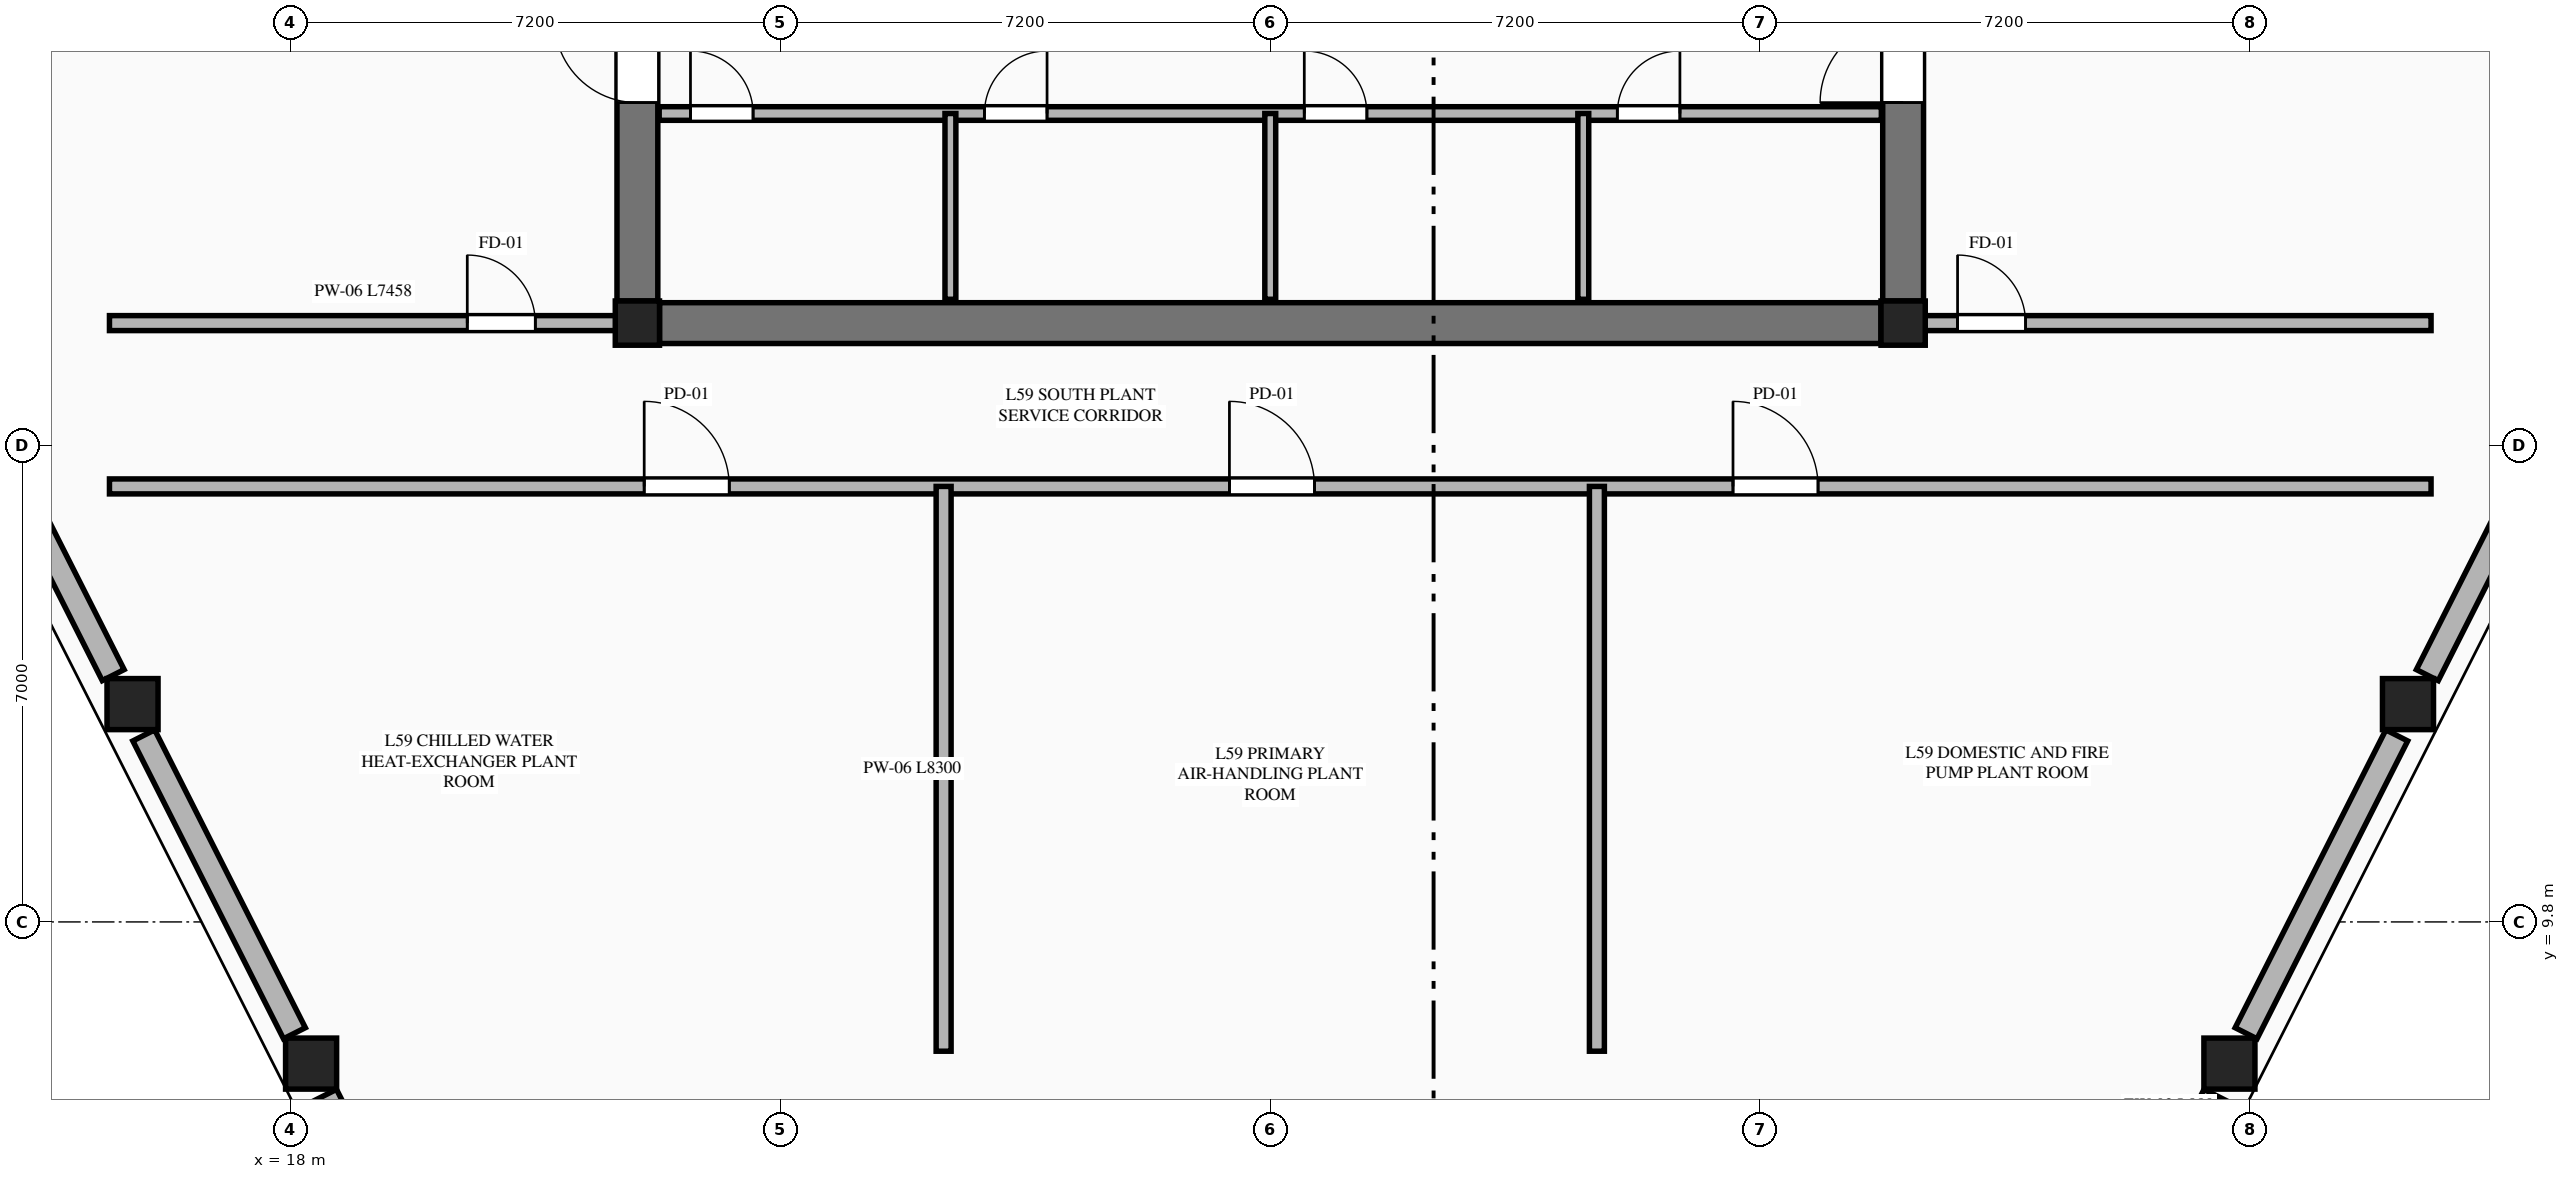
"""IFC4 building model, lengths in metres.
Left out: names, types, materials, properties, quantities, classifications, styles, units other than length and angle.
Written with IfcOpenShell. Run it as: python <this file> out.ifc"""

import sys

from ifc_helpers import new_model, si_unit, direction, frame, frame_2d, origin, origin_2d, place, context, subcontext, project, spatial, rectangle, extrude, element, fill, save


model = new_model("IFC4")
c1 = context("Model", 3, precision=1e-05, world=origin(), true_north=direction((0.0, 1.0)))
c2 = subcontext(c1, "Body", "Model", "MODEL_VIEW")
j1 = project(units=[si_unit("LENGTHUNIT", "METRE"), si_unit("PLANEANGLEUNIT", "RADIAN")], contexts=[c1])
p1 = place(None, origin())
s1 = spatial("IfcSite", under=j1, at=p1, CompositionType="ELEMENT")
p2 = place(p1, origin())
s2 = spatial("IfcBuilding", under=s1, at=p2, CompositionType="ELEMENT")
p3 = place(p2, frame((0.0, 0.0, 221.6)))
s3 = spatial("IfcBuildingStorey", under=s2, at=p3, CompositionType="ELEMENT", Elevation=221.6)
for number, where, z_axis, x_axis in (
    (1, (23.1, 18.6, 0.0), (0.0, 0.0, 1.0), (1.0, 0.0, 0.0)),
    (2, (41.7, 18.6, 0.0), (0.0, 0.0, 1.0), (1.0, 0.0, 0.0)),
):
    element("IfcColumn", number, at=place(p3, frame(where, z_axis=z_axis, x_axis=x_axis)), inside=s3, PredefinedType="COLUMN", context=c2, shape_type="SweptSolid", body=[
        extrude(rectangle(XDim=0.65, YDim=0.65, at=origin_2d()), origin(), (0.0, 0.0, 1.0), 5.4),
    ])
p4 = place(p3, frame((23.425, 18.6, 0.0), z_axis=(0.0, 0.0, 1.0), x_axis=(1.0, 0.0, 0.0)))
e3 = element("IfcWall", 3, at=p4, inside=s3, PredefinedType="SHEAR", context=c2, shape_type="SweptSolid", body=[
    extrude(rectangle(XDim=17.95, YDim=0.6, at=frame_2d((8.975, 0.0))), origin(), (0.0, 0.0, 1.0), 5.2),
])
p5 = place(p3, frame((23.1, 18.925, 0.0), z_axis=(0.0, 0.0, 1.0), x_axis=(0.0, 1.0, 0.0)))
e4 = element("IfcWall", 4, at=p5, inside=s3, PredefinedType="SHEAR", context=c2, shape_type="SweptSolid", body=[
    extrude(rectangle(XDim=13.95, YDim=0.6, at=frame_2d((6.975, 0.0))), origin(), (0.0, 0.0, 1.0), 5.2),
])
p6 = place(p5, frame((2.915, 0.0, 0.0)))
e5 = element("IfcOpeningElement", 5, at=p6, cuts=e4, PredefinedType="OPENING", context=c2, shape_type="SweptSolid", body=[
    extrude(rectangle(XDim=1.22, YDim=2.25, at=frame_2d((0.61, 1.125))), frame((0.0, 0.31, 0.0), z_axis=(0.0, -1.0, 0.0), x_axis=(1.0, 0.0, 0.0)), (0.0, 0.0, 1.0), 0.62),
])
p7 = place(p3, frame((41.7, 18.925, 0.0), z_axis=(0.0, 0.0, 1.0), x_axis=(0.0, 1.0, 0.0)))
e6 = element("IfcWall", 6, at=p7, inside=s3, PredefinedType="SHEAR", context=c2, shape_type="SweptSolid", body=[
    extrude(rectangle(XDim=13.95, YDim=0.6, at=frame_2d((6.975, 0.0))), origin(), (0.0, 0.0, 1.0), 5.2),
])
p8 = place(p7, frame((2.915, 0.0, 0.0)))
e7 = element("IfcOpeningElement", 7, at=p8, cuts=e6, PredefinedType="OPENING", context=c2, shape_type="SweptSolid", body=[
    extrude(rectangle(XDim=1.22, YDim=2.25, at=frame_2d((0.61, 1.125))), frame((0.0, 0.31, 0.0), z_axis=(0.0, -1.0, 0.0), x_axis=(1.0, 0.0, 0.0)), (0.0, 0.0, 1.0), 0.62),
])
for number, where, z_axis, x_axis in (
    (8, (46.495, 7.718, 0.0), (0.0, 0.0, 1.0), (1.0, 0.0, 0.0)),
    (9, (49.119, 13.001, 0.0), (0.0, 0.0, 1.0), (1.0, 0.0, 0.0)),
    (10, (15.681, 13.001, 0.0), (0.0, 0.0, 1.0), (1.0, 0.0, 0.0)),
    (11, (18.305, 7.718, 0.0), (0.0, 0.0, 1.0), (1.0, 0.0, 0.0)),
):
    element("IfcColumn", number, at=place(p3, frame(where, z_axis=z_axis, x_axis=x_axis)), inside=s3, PredefinedType="COLUMN", context=c2, shape_type="SweptSolid", body=[
        extrude(rectangle(XDim=0.75, YDim=0.75, at=origin_2d()), origin(), (0.0, 0.0, 1.0), 5.4),
    ])
p9 = place(p3, frame((23.42, 21.68, 0.0), z_axis=(0.0, 0.0, 1.0), x_axis=(1.0, 0.0, 0.0)))
e12 = element("IfcWall", 12, at=p9, inside=s3, PredefinedType="PLUMBINGWALL", context=c2, shape_type="SweptSolid", body=[
    extrude(rectangle(XDim=17.96, YDim=0.2, at=frame_2d((8.98, 0.0))), origin(), (0.0, 0.0, 1.0), 5.2),
])
p10 = place(p9, frame((0.46, 0.0, 0.0)))
e13 = element("IfcOpeningElement", 13, at=p10, cuts=e12, PredefinedType="OPENING", context=c2, shape_type="SweptSolid", body=[
    extrude(rectangle(XDim=0.92, YDim=2.15, at=frame_2d((0.46, 1.075))), frame((0.0, 0.11, 0.0), z_axis=(0.0, -1.0, 0.0), x_axis=(1.0, 0.0, 0.0)), (0.0, 0.0, 1.0), 0.22),
])
p11 = place(p9, frame((4.78, 0.0, 0.0)))
e14 = element("IfcOpeningElement", 14, at=p11, cuts=e12, PredefinedType="OPENING", context=c2, shape_type="SweptSolid", body=[
    extrude(rectangle(XDim=0.92, YDim=2.15, at=frame_2d((0.46, 1.075))), frame((0.0, 0.11, 0.0), z_axis=(0.0, -1.0, 0.0), x_axis=(1.0, 0.0, 0.0)), (0.0, 0.0, 1.0), 0.22),
])
p12 = place(p9, frame((9.48, 0.0, 0.0)))
e15 = element("IfcOpeningElement", 15, at=p12, cuts=e12, PredefinedType="OPENING", context=c2, shape_type="SweptSolid", body=[
    extrude(rectangle(XDim=0.92, YDim=2.15, at=frame_2d((0.46, 1.075))), frame((0.0, 0.11, 0.0), z_axis=(0.0, -1.0, 0.0), x_axis=(1.0, 0.0, 0.0)), (0.0, 0.0, 1.0), 0.22),
])
p13 = place(p9, frame((14.08, 0.0, 0.0)))
e16 = element("IfcOpeningElement", 16, at=p13, cuts=e12, PredefinedType="OPENING", context=c2, shape_type="SweptSolid", body=[
    extrude(rectangle(XDim=0.92, YDim=2.15, at=frame_2d((0.46, 1.075))), frame((0.0, 0.11, 0.0), z_axis=(0.0, -1.0, 0.0), x_axis=(1.0, 0.0, 0.0)), (0.0, 0.0, 1.0), 0.22),
])
for number, where, z_axis, x_axis in (
    (17, (27.7, 18.95, 0.0), (0.0, 0.0, 1.0), (0.0, 1.0, 0.0)),
    (18, (32.4, 18.95, 0.0), (0.0, 0.0, 1.0), (0.0, 1.0, 0.0)),
    (19, (37.0, 18.95, 0.0), (0.0, 0.0, 1.0), (0.0, 1.0, 0.0)),
):
    element("IfcWall", number, at=place(p3, frame(where, z_axis=z_axis, x_axis=x_axis)), inside=s3, PredefinedType="PARTITIONING", context=c2, shape_type="SweptSolid", body=[
        extrude(rectangle(XDim=2.73, YDim=0.16, at=frame_2d((1.365, 0.0))), origin(), (0.0, 0.0, 1.0), 5.2),
    ])
p14 = place(p3, frame((15.342, 18.6, 0.0), z_axis=(0.0, 0.0, 1.0), x_axis=(1.0, 0.0, 0.0)))
e20 = element("IfcWall", 20, at=p14, inside=s3, PredefinedType="PARTITIONING", context=c2, shape_type="SweptSolid", body=[
    extrude(rectangle(XDim=7.458, YDim=0.22, at=frame_2d((3.729, 0.0))), origin(), (0.0, 0.0, 1.0), 3.79),
])
p15 = place(p14, frame((5.258, 0.0, 0.0)))
e21 = element("IfcOpeningElement", 21, at=p15, cuts=e20, PredefinedType="OPENING", context=c2, shape_type="SweptSolid", body=[
    extrude(rectangle(XDim=1.0, YDim=2.15, at=frame_2d((0.5, 1.075))), frame((0.0, 0.12, 0.0), z_axis=(0.0, -1.0, 0.0), x_axis=(1.0, 0.0, 0.0)), (0.0, 0.0, 1.0), 0.24),
])
p16 = place(p3, frame((42.0, 18.6, 0.0), z_axis=(0.0, 0.0, 1.0), x_axis=(1.0, 0.0, 0.0)))
e22 = element("IfcWall", 22, at=p16, inside=s3, PredefinedType="PARTITIONING", context=c2, shape_type="SweptSolid", body=[
    extrude(rectangle(XDim=7.458, YDim=0.22, at=frame_2d((3.729, 0.0))), origin(), (0.0, 0.0, 1.0), 3.79),
])
p17 = place(p16, frame((0.5, 0.0, 0.0)))
e23 = element("IfcOpeningElement", 23, at=p17, cuts=e22, PredefinedType="OPENING", context=c2, shape_type="SweptSolid", body=[
    extrude(rectangle(XDim=1.0, YDim=2.15, at=frame_2d((0.5, 1.075))), frame((0.0, 0.12, 0.0), z_axis=(0.0, -1.0, 0.0), x_axis=(1.0, 0.0, 0.0)), (0.0, 0.0, 1.0), 0.24),
])
p18 = place(p3, frame((15.342, 16.2, 0.0), z_axis=(0.0, 0.0, 1.0), x_axis=(1.0, 0.0, 0.0)))
e24 = element("IfcWall", 24, at=p18, inside=s3, PredefinedType="PARTITIONING", context=c2, shape_type="SweptSolid", body=[
    extrude(rectangle(XDim=34.116, YDim=0.22, at=frame_2d((17.058, 0.0))), origin(), (0.0, 0.0, 1.0), 5.2),
])
p19 = place(p18, frame((7.858, 0.0, 0.0)))
e25 = element("IfcOpeningElement", 25, at=p19, cuts=e24, PredefinedType="OPENING", context=c2, shape_type="SweptSolid", body=[
    extrude(rectangle(XDim=1.25, YDim=2.25, at=frame_2d((0.625, 1.125))), frame((0.0, 0.12, 0.0), z_axis=(0.0, -1.0, 0.0), x_axis=(1.0, 0.0, 0.0)), (0.0, 0.0, 1.0), 0.24),
])
p20 = place(p18, frame((16.458, 0.0, 0.0)))
e26 = element("IfcOpeningElement", 26, at=p20, cuts=e24, PredefinedType="OPENING", context=c2, shape_type="SweptSolid", body=[
    extrude(rectangle(XDim=1.25, YDim=2.25, at=frame_2d((0.625, 1.125))), frame((0.0, 0.12, 0.0), z_axis=(0.0, -1.0, 0.0), x_axis=(1.0, 0.0, 0.0)), (0.0, 0.0, 1.0), 0.24),
])
p21 = place(p18, frame((23.858, 0.0, 0.0)))
e27 = element("IfcOpeningElement", 27, at=p21, cuts=e24, PredefinedType="OPENING", context=c2, shape_type="SweptSolid", body=[
    extrude(rectangle(XDim=1.25, YDim=2.25, at=frame_2d((0.625, 1.125))), frame((0.0, 0.12, 0.0), z_axis=(0.0, -1.0, 0.0), x_axis=(1.0, 0.0, 0.0)), (0.0, 0.0, 1.0), 0.24),
])
for number, where, z_axis, x_axis in (
    (28, (27.6, 7.9, 0.0), (0.0, 0.0, 1.0), (0.0, 1.0, 0.0)),
    (29, (37.2, 7.9, 0.0), (0.0, 0.0, 1.0), (0.0, 1.0, 0.0)),
):
    element("IfcWall", number, at=place(p3, frame(where, z_axis=z_axis, x_axis=x_axis)), inside=s3, PredefinedType="PARTITIONING", context=c2, shape_type="SweptSolid", body=[
        extrude(rectangle(XDim=8.3, YDim=0.22, at=frame_2d((4.15, 0.0))), origin(), (0.0, 0.0, 1.0), 5.2),
    ])
p22 = place(p3, frame((45.881, 6.465, 0.0), z_axis=(0.0, 0.0, 1.0), x_axis=(0.451165850885, 0.89244012404, 0.0)))
e30 = element("IfcWall", 30, at=p22, inside=s3, PredefinedType="STANDARD", context=c2, shape_type="SweptSolid", body=[
    extrude(rectangle(XDim=0.888, YDim=0.36, at=frame_2d((0.444, 0.0))), origin(), (0.0, 0.0, 1.0), 5.2),
])
p23 = place(p3, frame((46.74, 8.164, 0.0), z_axis=(0.0, 0.0, 1.0), x_axis=(0.451389625798, 0.892326961221, 0.0)))
e31 = element("IfcWall", 31, at=p23, inside=s3, PredefinedType="STANDARD", context=c2, shape_type="SweptSolid", body=[
    extrude(rectangle(XDim=4.905, YDim=0.36, at=frame_2d((2.453, 0.0))), origin(), (0.0, 0.0, 1.0), 3.79),
])
for number, where, z_axis, x_axis in (
    (32, (49.403, 13.427, 0.0), (0.0, 0.0, 1.0), (0.451, 0.892, 0.0)),
    (33, (13.1, 17.969, 0.0), (0.0, 0.0, 1.0), (0.451, -0.892, 0.0)),
):
    element("IfcWall", number, at=place(p3, frame(where, z_axis=z_axis, x_axis=x_axis)), inside=s3, PredefinedType="STANDARD", context=c2, shape_type="SweptSolid", body=[
        extrude(rectangle(XDim=5.09, YDim=0.36, at=frame_2d((2.545, 0.0))), origin(), (0.0, 0.0, 1.0), 3.79),
    ])
p24 = place(p3, frame((15.846, 12.541, 0.0), z_axis=(0.0, 0.0, 1.0), x_axis=(0.451389625798, -0.892326961221, 0.0)))
e34 = element("IfcWall", 34, at=p24, inside=s3, PredefinedType="STANDARD", context=c2, shape_type="SweptSolid", body=[
    extrude(rectangle(XDim=4.905, YDim=0.36, at=frame_2d((2.453, 0.0))), origin(), (0.0, 0.0, 1.0), 3.79),
])
p25 = place(p3, frame((18.518, 7.258, 0.0), z_axis=(0.0, 0.0, 1.0), x_axis=(0.451165850885, -0.89244012404, 0.0)))
e35 = element("IfcWall", 35, at=p25, inside=s3, PredefinedType="STANDARD", context=c2, shape_type="SweptSolid", body=[
    extrude(rectangle(XDim=0.888, YDim=0.36, at=frame_2d((0.444, 0.0))), origin(), (0.0, 0.0, 1.0), 5.2),
])
p26 = place(p6, origin())
e36 = element("IfcDoor", 36, at=p26, inside=s3, OperationType="SINGLE_SWING_RIGHT", PredefinedType="DOOR", context=c2, shape_type="SweptSolid", body=[
    extrude(rectangle(XDim=1.22, YDim=2.25, at=frame_2d((0.61, 1.125))), frame((0.0, 0.025, 0.0), z_axis=(0.0, -1.0, 0.0), x_axis=(1.0, 0.0, 0.0)), (0.0, 0.0, 1.0), 0.05),
])
fill(e5, e36)
p27 = place(p8, origin())
e37 = element("IfcDoor", 37, at=p27, inside=s3, OperationType="SINGLE_SWING_LEFT", PredefinedType="DOOR", context=c2, shape_type="SweptSolid", body=[
    extrude(rectangle(XDim=1.22, YDim=2.25, at=frame_2d((0.61, 1.125))), frame((0.0, 0.025, 0.0), z_axis=(0.0, -1.0, 0.0), x_axis=(1.0, 0.0, 0.0)), (0.0, 0.0, 1.0), 0.05),
])
fill(e7, e37)
p28 = place(p10, origin())
e38 = element("IfcDoor", 38, at=p28, inside=s3, OperationType="SINGLE_SWING_LEFT", PredefinedType="DOOR", context=c2, shape_type="SweptSolid", body=[
    extrude(rectangle(XDim=0.92, YDim=2.15, at=frame_2d((0.46, 1.075))), frame((0.0, 0.025, 0.0), z_axis=(0.0, -1.0, 0.0), x_axis=(1.0, 0.0, 0.0)), (0.0, 0.0, 1.0), 0.05),
])
fill(e13, e38)
p29 = place(p11, origin())
e39 = element("IfcDoor", 39, at=p29, inside=s3, OperationType="SINGLE_SWING_RIGHT", PredefinedType="DOOR", context=c2, shape_type="SweptSolid", body=[
    extrude(rectangle(XDim=0.92, YDim=2.15, at=frame_2d((0.46, 1.075))), frame((0.0, 0.025, 0.0), z_axis=(0.0, -1.0, 0.0), x_axis=(1.0, 0.0, 0.0)), (0.0, 0.0, 1.0), 0.05),
])
fill(e14, e39)
p30 = place(p12, origin())
e40 = element("IfcDoor", 40, at=p30, inside=s3, OperationType="SINGLE_SWING_LEFT", PredefinedType="DOOR", context=c2, shape_type="SweptSolid", body=[
    extrude(rectangle(XDim=0.92, YDim=2.15, at=frame_2d((0.46, 1.075))), frame((0.0, 0.025, 0.0), z_axis=(0.0, -1.0, 0.0), x_axis=(1.0, 0.0, 0.0)), (0.0, 0.0, 1.0), 0.05),
])
fill(e15, e40)
p31 = place(p13, origin())
e41 = element("IfcDoor", 41, at=p31, inside=s3, OperationType="SINGLE_SWING_RIGHT", PredefinedType="DOOR", context=c2, shape_type="SweptSolid", body=[
    extrude(rectangle(XDim=0.92, YDim=2.15, at=frame_2d((0.46, 1.075))), frame((0.0, 0.025, 0.0), z_axis=(0.0, -1.0, 0.0), x_axis=(1.0, 0.0, 0.0)), (0.0, 0.0, 1.0), 0.05),
])
fill(e16, e41)
p32 = place(p15, origin())
e42 = element("IfcDoor", 42, at=p32, inside=s3, OperationType="SINGLE_SWING_LEFT", PredefinedType="DOOR", context=c2, shape_type="SweptSolid", body=[
    extrude(rectangle(XDim=1.0, YDim=2.15, at=frame_2d((0.5, 1.075))), frame((0.0, 0.025, 0.0), z_axis=(0.0, -1.0, 0.0), x_axis=(1.0, 0.0, 0.0)), (0.0, 0.0, 1.0), 0.05),
])
fill(e21, e42)
p33 = place(p17, origin())
e43 = element("IfcDoor", 43, at=p33, inside=s3, OperationType="SINGLE_SWING_LEFT", PredefinedType="DOOR", context=c2, shape_type="SweptSolid", body=[
    extrude(rectangle(XDim=1.0, YDim=2.15, at=frame_2d((0.5, 1.075))), frame((0.0, 0.025, 0.0), z_axis=(0.0, -1.0, 0.0), x_axis=(1.0, 0.0, 0.0)), (0.0, 0.0, 1.0), 0.05),
])
fill(e23, e43)
p34 = place(p19, origin())
e44 = element("IfcDoor", 44, at=p34, inside=s3, OperationType="SINGLE_SWING_LEFT", PredefinedType="DOOR", context=c2, shape_type="SweptSolid", body=[
    extrude(rectangle(XDim=1.25, YDim=2.25, at=frame_2d((0.625, 1.125))), frame((0.0, 0.025, 0.0), z_axis=(0.0, -1.0, 0.0), x_axis=(1.0, 0.0, 0.0)), (0.0, 0.0, 1.0), 0.05),
])
fill(e25, e44)
p35 = place(p20, origin())
e45 = element("IfcDoor", 45, at=p35, inside=s3, OperationType="SINGLE_SWING_LEFT", PredefinedType="DOOR", context=c2, shape_type="SweptSolid", body=[
    extrude(rectangle(XDim=1.25, YDim=2.25, at=frame_2d((0.625, 1.125))), frame((0.0, 0.025, 0.0), z_axis=(0.0, -1.0, 0.0), x_axis=(1.0, 0.0, 0.0)), (0.0, 0.0, 1.0), 0.05),
])
fill(e26, e45)
p36 = place(p21, origin())
e46 = element("IfcDoor", 46, at=p36, inside=s3, OperationType="SINGLE_SWING_LEFT", PredefinedType="DOOR", context=c2, shape_type="SweptSolid", body=[
    extrude(rectangle(XDim=1.25, YDim=2.25, at=frame_2d((0.625, 1.125))), frame((0.0, 0.025, 0.0), z_axis=(0.0, -1.0, 0.0), x_axis=(1.0, 0.0, 0.0)), (0.0, 0.0, 1.0), 0.05),
])
fill(e27, e46)
save(model, sys.argv[1])
